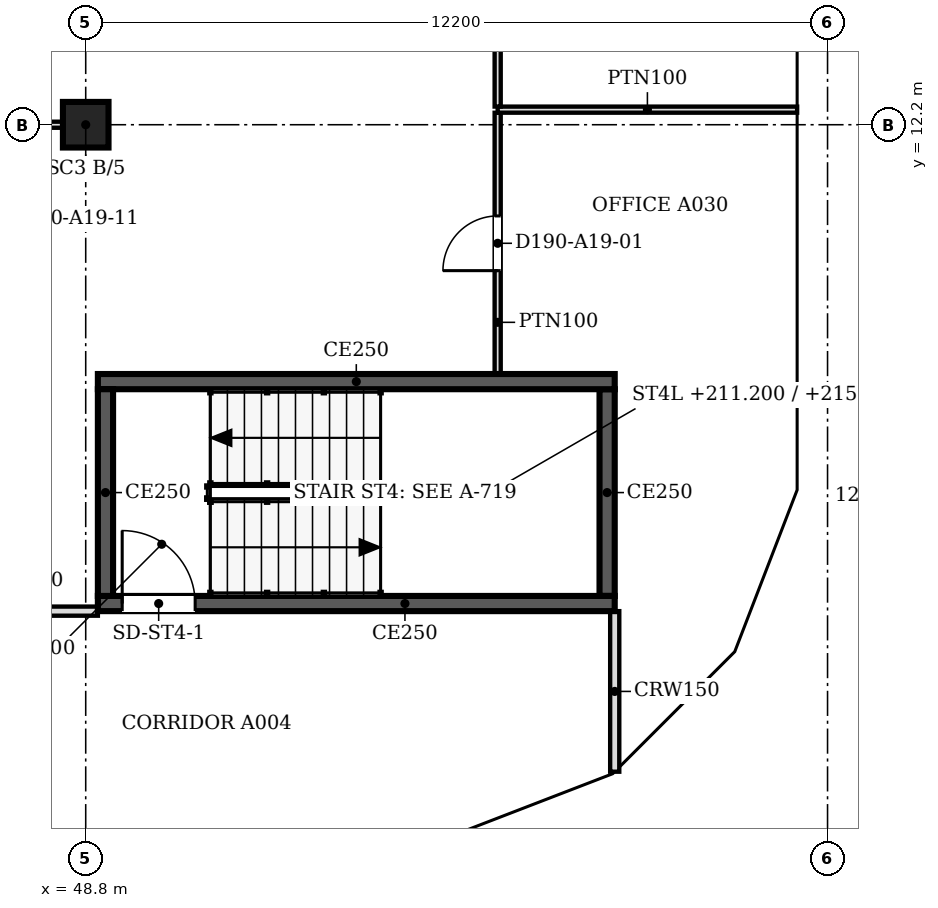
"""IFC4 building model, lengths in metres.
Left out: names, types, materials, properties, quantities, classifications, styles, units other than length and angle.
Written with IfcOpenShell. Run it as: python <this file> out.ifc"""

import sys

from ifc_helpers import new_model, si_unit, direction, frame, frame_2d, origin, origin_2d, place, context, subcontext, project, spatial, polyline, rectangle, outline, extrude, faceted_brep, source, transform, mapped, element, fill, save


model = new_model("IFC4")
c1 = context("Model", 3, precision=1e-05, world=origin(), true_north=direction((0.0, 1.0)))
c2 = subcontext(c1, "Body", "Model", "MODEL_VIEW")
j1 = project(units=[si_unit("LENGTHUNIT", "METRE"), si_unit("PLANEANGLEUNIT", "RADIAN")], contexts=[c1])
p1 = place(None, origin())
s1 = spatial("IfcSite", under=j1, at=p1, CompositionType="ELEMENT")
p2 = place(p1, origin())
s2 = spatial("IfcBuilding", under=s1, at=p2, CompositionType="ELEMENT")
p3 = place(p2, frame((0.0, 0.0, 209.3)))
s3 = spatial("IfcBuildingStorey", under=s2, at=p3, CompositionType="ELEMENT", Elevation=209.3)
p4 = place(p3, frame((48.8, 12.2, 0.0), z_axis=(0.0, 0.0, 1.0), x_axis=(1.0, 0.0, 0.0)))
e1 = element("IfcColumn", 1, at=p4, inside=s3, PredefinedType="COLUMN", context=c2, shape_type="SweptSolid", body=[
    extrude(rectangle(XDim=0.75, YDim=0.75, at=origin_2d()), origin(), (0.0, 0.0, 1.0), 3.6),
])
m1 = source(origin(), c2, "Body", "Brep", [
    faceted_brep([(2.95, -0.25, 0.0), (3.003, -0.25, 0.068), (3.003, -0.25, 7.532), (2.95, -0.25, 7.6), (0.0, -0.25, 3.8), (0.047, 0.25, 3.86), (2.898, 0.25, 7.532), (2.898, 0.25, 0.068), (0.047, 0.25, 3.74), (2.95, 0.0, 0.0), (2.95, 0.0, 7.6), (0.0, 0.0, 3.8)], [[[0, 1, 2, 3, 4]], [[5, 6, 7, 8]], [[1, 0, 9]], [[10, 3, 2]], [[6, 5, 11, 4, 3, 10]], [[8, 7, 9, 0, 4, 11]], [[8, 11, 5]], [[1, 9, 7, 6, 10, 2]]]),
])
p5 = place(p3, frame((54.854, 0.25, -3.8), z_axis=(0.0, 0.0, 1.0), x_axis=(0.932970071518, 0.359953949349, 0.0)))
e2 = element("IfcWall", 2, at=p5, inside=s3, PredefinedType="SOLIDWALL", context=c2, shape_type="MappedRepresentation", body=[
    mapped(m1, transform((0.0, 0.0, 0.0), scale=1.0)),
])
m2 = source(origin(), c2, "Body", "SweptSolid", [
    extrude(outline(polyline([(2.75, 6.935), (0.316, 3.8), (2.75, 0.665), (2.75, 6.935)])), frame((0.0, 0.26, 0.0), z_axis=(0.0, -1.0, 0.0), x_axis=(1.0, 0.0, 0.0)), (0.0, 0.0, 1.0), 0.52),
])
p6 = place(p5, origin())
e3 = element("IfcOpeningElement", 3, at=p6, cuts=e2, PredefinedType="OPENING", context=c2, shape_type="MappedRepresentation", body=[
    mapped(m2, transform((0.0, 0.0, 0.0), scale=1.0)),
])
m3 = source(origin(), c2, "Body", "Brep", [
    faceted_brep([(0.053, -0.25, 0.0), (2.997, -0.25, 3.8), (0.053, -0.25, 7.6), (0.0, -0.25, 7.532), (0.0, -0.25, 0.068), (0.106, 0.25, 7.532), (2.944, 0.25, 3.868), (2.944, 0.25, 3.732), (0.106, 0.25, 0.068), (2.997, 0.0, 3.8), (0.053, 0.0, 0.0), (0.053, 0.0, 7.6)], [[[0, 1, 2, 3, 4]], [[5, 6, 7, 8]], [[8, 7, 9, 1, 0, 10]], [[6, 5, 11, 2, 1, 9]], [[3, 2, 11]], [[10, 0, 4]], [[8, 10, 4, 3, 11, 5]], [[9, 7, 6]]]),
])
p7 = place(p3, frame((57.569, 1.274, -3.8), z_axis=(0.0, 0.0, 1.0), x_axis=(0.707066050402, 0.707147509625, 0.0)))
e4 = element("IfcWall", 4, at=p7, inside=s3, PredefinedType="SOLIDWALL", context=c2, shape_type="MappedRepresentation", body=[
    mapped(m3, transform((0.0, 0.0, 0.0), scale=1.0)),
])
m4 = source(origin(), c2, "Body", "SweptSolid", [
    extrude(outline(polyline([(0.253, 0.666), (2.681, 3.8), (0.253, 6.934), (0.253, 0.666)])), frame((0.0, 0.26, 0.0), z_axis=(0.0, -1.0, 0.0), x_axis=(1.0, 0.0, 0.0)), (0.0, 0.0, 1.0), 0.52),
])
p8 = place(p7, origin())
e5 = element("IfcOpeningElement", 5, at=p8, cuts=e4, PredefinedType="OPENING", context=c2, shape_type="MappedRepresentation", body=[
    mapped(m4, transform((0.0, 0.0, 0.0), scale=1.0)),
])
m5 = source(origin(), c2, "Body", "Brep", [
    faceted_brep([(2.95, -0.25, 0.0), (2.997, -0.25, 0.059), (2.997, -0.25, 7.541), (2.95, -0.25, 7.6), (0.0, -0.25, 3.8), (0.053, 0.25, 3.868), (2.904, 0.25, 7.54), (2.904, 0.25, 0.06), (0.053, 0.25, 3.732), (2.95, 0.0, 0.0), (2.95, 0.0, 7.6), (0.0, 0.0, 3.8)], [[[0, 1, 2, 3, 4]], [[5, 6, 7, 8]], [[1, 0, 9]], [[10, 3, 2]], [[6, 5, 11, 4, 3, 10]], [[8, 7, 9, 0, 4, 11]], [[8, 11, 5]], [[1, 9, 7, 6, 10, 2]]]),
])
p9 = place(p3, frame((59.688, 3.394, -3.8), z_axis=(0.0, 0.0, 1.0), x_axis=(0.359972353723, 0.932962970624, 0.0)))
e6 = element("IfcWall", 6, at=p9, inside=s3, PredefinedType="SOLIDWALL", context=c2, shape_type="MappedRepresentation", body=[
    mapped(m5, transform((0.0, 0.0, 0.0), scale=1.0)),
])
p10 = place(p9, origin())
e7 = element("IfcOpeningElement", 7, at=p10, cuts=e6, PredefinedType="OPENING", context=c2, shape_type="MappedRepresentation", body=[
    mapped(m2, transform((0.0, 0.0, 0.0), scale=1.0)),
])
m6 = source(origin(), c2, "Body", "Brep", [
    faceted_brep([(0.047, -0.25, 0.0), (3.05, -0.25, 3.8), (0.047, -0.25, 7.6), (0.0, -0.25, 7.54), (0.0, -0.25, 0.06), (0.093, 0.25, 7.541), (3.05, 0.25, 3.8), (0.093, 0.25, 0.059), (0.047, 0.0, 0.0), (0.047, 0.0, 7.6)], [[[0, 1, 2, 3, 4]], [[5, 6, 7]], [[7, 6, 1, 0, 8]], [[6, 5, 9, 2, 1]], [[3, 2, 9]], [[8, 0, 4]], [[7, 8, 4, 3, 9, 5]]]),
])
p11 = place(p3, frame((60.75, 6.1, -3.8), z_axis=(0.0, 0.0, 1.0), x_axis=(0.0, 1.0, 0.0)))
e8 = element("IfcWall", 8, at=p11, inside=s3, PredefinedType="SOLIDWALL", context=c2, shape_type="MappedRepresentation", body=[
    mapped(m6, transform((0.0, 0.0, 0.0), scale=1.0)),
])
m7 = source(origin(), c2, "Body", "SweptSolid", [
    extrude(outline(polyline([(0.247, 0.656), (2.731, 3.8), (0.247, 6.944), (0.247, 0.656)])), frame((0.0, 0.26, 0.0), z_axis=(0.0, -1.0, 0.0), x_axis=(1.0, 0.0, 0.0)), (0.0, 0.0, 1.0), 0.52),
])
p12 = place(p11, origin())
e9 = element("IfcOpeningElement", 9, at=p12, cuts=e8, PredefinedType="OPENING", context=c2, shape_type="MappedRepresentation", body=[
    mapped(m7, transform((0.0, 0.0, 0.0), scale=1.0)),
])
m8 = source(origin(), c2, "Body", "SweptSolid", [
    extrude(outline(polyline([(3.05, 0.0), (6.1, 3.8), (3.05, 7.6), (0.0, 3.8), (3.05, 0.0)])), frame((0.0, 0.25, 0.0), z_axis=(0.0, -1.0, 0.0), x_axis=(1.0, 0.0, 0.0)), (0.0, 0.0, 1.0), 0.5),
])
p13 = place(p3, frame((60.75, 9.15, -3.8), z_axis=(0.0, 0.0, 1.0), x_axis=(0.0, 1.0, 0.0)))
e10 = element("IfcWall", 10, at=p13, inside=s3, PredefinedType="SOLIDWALL", context=c2, shape_type="MappedRepresentation", body=[
    mapped(m8, transform((0.0, 0.0, 0.0), scale=1.0)),
])
m9 = source(origin(), c2, "Body", "SweptSolid", [
    extrude(outline(polyline([(3.05, 0.399), (5.78, 3.8), (3.05, 7.201), (0.321, 3.8), (3.05, 0.399)])), frame((0.0, 0.26, 0.0), z_axis=(0.0, -1.0, 0.0), x_axis=(1.0, 0.0, 0.0)), (0.0, 0.0, 1.0), 0.52),
])
p14 = place(p13, origin())
e11 = element("IfcOpeningElement", 11, at=p14, cuts=e10, PredefinedType="OPENING", context=c2, shape_type="MappedRepresentation", body=[
    mapped(m9, transform((0.0, 0.0, 0.0), scale=1.0)),
])
p15 = place(p2, frame((0.0, 0.0, 213.1)))
s4 = spatial("IfcBuildingStorey", under=s2, at=p15, CompositionType="ELEMENT", Elevation=213.1)
m10 = source(origin(), c2, "Body", "Brep", [
    faceted_brep([(0.047, -0.25, 0.0), (2.997, -0.25, 3.8), (0.047, -0.25, 7.6), (0.0, -0.25, 7.541), (0.0, -0.25, 0.059), (0.093, 0.25, 7.54), (2.944, 0.25, 3.868), (2.944, 0.25, 3.732), (0.093, 0.25, 0.06), (2.997, 0.0, 3.8), (0.047, 0.0, 0.0), (0.047, 0.0, 7.6)], [[[0, 1, 2, 3, 4]], [[5, 6, 7, 8]], [[8, 7, 9, 1, 0, 10]], [[6, 5, 11, 2, 1, 9]], [[3, 2, 11]], [[10, 0, 4]], [[8, 10, 4, 3, 11, 5]], [[7, 6, 9]]]),
])
p16 = place(p15, frame((54.81, 0.233, -3.8), z_axis=(0.0, 0.0, 1.0), x_axis=(0.932990326376, 0.359901446078, 0.0)))
e12 = element("IfcWall", 12, at=p16, inside=s4, PredefinedType="SOLIDWALL", context=c2, shape_type="MappedRepresentation", body=[
    mapped(m10, transform((0.0, 0.0, 0.0), scale=1.0)),
])
m11 = source(origin(), c2, "Body", "SweptSolid", [
    extrude(outline(polyline([(0.247, 0.665), (2.681, 3.8), (0.247, 6.935), (0.247, 0.665)])), frame((0.0, 0.26, 0.0), z_axis=(0.0, -1.0, 0.0), x_axis=(1.0, 0.0, 0.0)), (0.0, 0.0, 1.0), 0.52),
])
p17 = place(p16, origin())
e13 = element("IfcOpeningElement", 13, at=p17, cuts=e12, PredefinedType="OPENING", context=c2, shape_type="MappedRepresentation", body=[
    mapped(m11, transform((0.0, 0.0, 0.0), scale=1.0)),
])
m12 = source(origin(), c2, "Body", "Brep", [
    faceted_brep([(2.944, -0.25, 0.0), (2.997, -0.25, 0.068), (2.997, -0.25, 7.532), (2.944, -0.25, 7.6), (0.0, -0.25, 3.8), (0.053, 0.25, 3.868), (2.891, 0.25, 7.532), (2.891, 0.25, 0.068), (0.053, 0.25, 3.732), (2.944, 0.0, 0.0), (2.944, 0.0, 7.6), (0.0, 0.0, 3.8)], [[[0, 1, 2, 3, 4]], [[5, 6, 7, 8]], [[1, 0, 9]], [[10, 3, 2]], [[6, 5, 11, 4, 3, 10]], [[8, 7, 9, 0, 4, 11]], [[8, 11, 5]], [[1, 9, 7, 6, 10, 2]]]),
])
p18 = place(p15, frame((57.606, 1.312, -3.8), z_axis=(0.0, 0.0, 1.0), x_axis=(0.707147509625, 0.707066050402, 0.0)))
e14 = element("IfcWall", 14, at=p18, inside=s4, PredefinedType="SOLIDWALL", context=c2, shape_type="MappedRepresentation", body=[
    mapped(m12, transform((0.0, 0.0, 0.0), scale=1.0)),
])
m13 = source(origin(), c2, "Body", "SweptSolid", [
    extrude(outline(polyline([(2.744, 6.934), (0.316, 3.8), (2.744, 0.666), (2.744, 6.934)])), frame((0.0, 0.26, 0.0), z_axis=(0.0, -1.0, 0.0), x_axis=(1.0, 0.0, 0.0)), (0.0, 0.0, 1.0), 0.52),
])
p19 = place(p18, origin())
e15 = element("IfcOpeningElement", 15, at=p19, cuts=e14, PredefinedType="OPENING", context=c2, shape_type="MappedRepresentation", body=[
    mapped(m13, transform((0.0, 0.0, 0.0), scale=1.0)),
])
m14 = source(origin(), c2, "Body", "Brep", [
    faceted_brep([(0.053, -0.25, 0.0), (3.003, -0.25, 3.8), (0.053, -0.25, 7.6), (0.0, -0.25, 7.531), (0.0, -0.25, 0.068), (0.106, 0.25, 7.532), (2.957, 0.25, 3.86), (2.957, 0.25, 3.74), (0.106, 0.25, 0.068), (3.003, 0.0, 3.8), (0.053, 0.0, 0.0), (0.053, 0.0, 7.6)], [[[0, 1, 2, 3, 4]], [[5, 6, 7, 8]], [[8, 7, 9, 1, 0, 10]], [[6, 5, 11, 2, 1, 9]], [[3, 2, 11]], [[10, 0, 4]], [[8, 10, 4, 3, 11, 5]], [[7, 6, 9]]]),
])
p20 = place(p15, frame((59.669, 3.344, -3.8), z_axis=(0.0, 0.0, 1.0), x_axis=(0.35992665181, 0.932980602862, 0.0)))
e16 = element("IfcWall", 16, at=p20, inside=s4, PredefinedType="SOLIDWALL", context=c2, shape_type="MappedRepresentation", body=[
    mapped(m14, transform((0.0, 0.0, 0.0), scale=1.0)),
])
m15 = source(origin(), c2, "Body", "SweptSolid", [
    extrude(outline(polyline([(0.253, 0.665), (2.687, 3.8), (0.253, 6.935), (0.253, 0.665)])), frame((0.0, 0.26, 0.0), z_axis=(0.0, -1.0, 0.0), x_axis=(1.0, 0.0, 0.0)), (0.0, 0.0, 1.0), 0.52),
])
p21 = place(p20, origin())
e17 = element("IfcOpeningElement", 17, at=p21, cuts=e16, PredefinedType="OPENING", context=c2, shape_type="MappedRepresentation", body=[
    mapped(m15, transform((0.0, 0.0, 0.0), scale=1.0)),
])
m16 = source(origin(), c2, "Body", "Brep", [
    faceted_brep([(3.003, -0.25, 0.0), (6.053, -0.25, 3.8), (3.003, -0.25, 7.6), (0.0, -0.25, 3.8), (0.047, 0.25, 3.859), (3.003, 0.25, 7.6), (6.053, 0.25, 3.8), (3.003, 0.25, 0.0), (0.047, 0.25, 3.741), (0.0, 0.0, 3.8)], [[[0, 1, 2, 3]], [[4, 5, 6, 7, 8]], [[7, 6, 1, 0]], [[6, 5, 2, 1]], [[5, 4, 9, 3, 2]], [[8, 7, 0, 3, 9]], [[8, 9, 4]]]),
])
p22 = place(p15, frame((60.75, 6.146, -3.8), z_axis=(0.0, 0.0, 1.0), x_axis=(0.0, 1.0, 0.0)))
e18 = element("IfcWall", 18, at=p22, inside=s4, PredefinedType="SOLIDWALL", context=c2, shape_type="MappedRepresentation", body=[
    mapped(m16, transform((0.0, 0.0, 0.0), scale=1.0)),
])
m17 = source(origin(), c2, "Body", "SweptSolid", [
    extrude(outline(polyline([(3.005, 0.401), (5.733, 3.8), (3.005, 7.199), (0.319, 3.8), (3.005, 0.401)])), frame((0.0, 0.26, 0.0), z_axis=(0.0, -1.0, 0.0), x_axis=(1.0, 0.0, 0.0)), (0.0, 0.0, 1.0), 0.52),
])
p23 = place(p22, origin())
e19 = element("IfcOpeningElement", 19, at=p23, cuts=e18, PredefinedType="OPENING", context=c2, shape_type="MappedRepresentation", body=[
    mapped(m17, transform((0.0, 0.0, 0.0), scale=1.0)),
])
m18 = source(origin(), c2, "Body", "SweptSolid", [
    extrude(outline(polyline([(3.05, 0.0), (6.1, 3.8), (3.05, 7.6), (0.0, 3.8), (3.05, 0.0)])), frame((0.0, 0.25, 0.0), z_axis=(0.0, -1.0, 0.0), x_axis=(1.0, 0.0, 0.0)), (0.0, 0.0, 1.0), 0.5),
])
p24 = place(p15, frame((60.75, 12.2, -3.8), z_axis=(0.0, 0.0, 1.0), x_axis=(0.0, 1.0, 0.0)))
e20 = element("IfcWall", 20, at=p24, inside=s4, PredefinedType="SOLIDWALL", context=c2, shape_type="MappedRepresentation", body=[
    mapped(m18, transform((0.0, 0.0, 0.0), scale=1.0)),
])
m19 = source(origin(), c2, "Body", "SweptSolid", [
    extrude(outline(polyline([(3.05, 0.399), (5.78, 3.8), (3.05, 7.2), (0.321, 3.8), (3.05, 0.399)])), frame((0.0, 0.26, 0.0), z_axis=(0.0, -1.0, 0.0), x_axis=(1.0, 0.0, 0.0)), (0.0, 0.0, 1.0), 0.52),
])
p25 = place(p24, origin())
e21 = element("IfcOpeningElement", 21, at=p25, cuts=e20, PredefinedType="OPENING", context=c2, shape_type="MappedRepresentation", body=[
    mapped(m19, transform((0.0, 0.0, 0.0), scale=1.0)),
])
p26 = place(p3, frame((57.5, 4.325, 0.0), z_axis=(0.0, 0.0, 1.0), x_axis=(-1.0, 0.0, 0.0)))
e22 = element("IfcWall", 22, at=p26, inside=s3, PredefinedType="SOLIDWALL", context=c2, shape_type="SweptSolid", body=[
    extrude(rectangle(XDim=8.5, YDim=0.25, at=frame_2d((4.25, 0.0))), origin(), (0.0, 0.0, 1.0), 3.8),
])
m20 = source(origin(), c2, "Body", "SweptSolid", [
    extrude(rectangle(XDim=1.2, YDim=2.1, at=frame_2d((0.6, 1.05))), frame((0.0, 0.135, 0.0), z_axis=(0.0, -1.0, 0.0), x_axis=(1.0, 0.0, 0.0)), (0.0, 0.0, 1.0), 0.27),
])
p27 = place(p26, frame((6.9, 0.0, 0.0)))
e23 = element("IfcOpeningElement", 23, at=p27, cuts=e22, PredefinedType="OPENING", context=c2, shape_type="MappedRepresentation", body=[
    mapped(m20, transform((0.0, 0.0, 0.0), scale=1.0)),
])
p28 = place(p3, frame((49.125, 4.45, 0.0), z_axis=(0.0, 0.0, 1.0), x_axis=(0.0, 1.0, 0.0)))
e24 = element("IfcWall", 24, at=p28, inside=s3, PredefinedType="SOLIDWALL", context=c2, shape_type="SweptSolid", body=[
    extrude(rectangle(XDim=3.4, YDim=0.25, at=frame_2d((1.7, 0.0))), origin(), (0.0, 0.0, 1.0), 3.8),
])
p29 = place(p3, frame((49.0, 7.975, 0.0), z_axis=(0.0, 0.0, 1.0), x_axis=(1.0, 0.0, 0.0)))
e25 = element("IfcWall", 25, at=p29, inside=s3, PredefinedType="SOLIDWALL", context=c2, shape_type="SweptSolid", body=[
    extrude(rectangle(XDim=8.5, YDim=0.25, at=frame_2d((4.25, 0.0))), origin(), (0.0, 0.0, 1.0), 3.8),
])
p30 = place(p3, frame((57.375, 7.85, 0.0), z_axis=(0.0, 0.0, 1.0), x_axis=(0.0, -1.0, 0.0)))
e26 = element("IfcWall", 26, at=p30, inside=s3, PredefinedType="SOLIDWALL", context=c2, shape_type="SweptSolid", body=[
    extrude(rectangle(XDim=3.4, YDim=0.25, at=frame_2d((1.7, 0.0))), origin(), (0.0, 0.0, 1.0), 3.8),
])
p31 = place(p3, frame((57.5, 1.559, 0.0), z_axis=(0.0, 0.0, 1.0), x_axis=(0.0, 1.0, 0.0)))
e27 = element("IfcWall", 27, at=p31, inside=s3, PredefinedType="PARTITIONING", context=c2, shape_type="SweptSolid", body=[
    extrude(rectangle(XDim=2.641, YDim=0.15, at=frame_2d((1.32, 0.0))), origin(), (0.0, 0.0, 1.0), 3.067),
])
p32 = place(p3, frame((46.476, 4.2, 0.0), z_axis=(0.0, 0.0, 1.0), x_axis=(1.0, 0.0, 0.0)))
e28 = element("IfcWall", 28, at=p32, inside=s3, PredefinedType="PARTITIONING", context=c2, shape_type="SweptSolid", body=[
    extrude(rectangle(XDim=2.524, YDim=0.15, at=frame_2d((1.262, 0.0))), origin(), (0.0, 0.0, 1.0), 3.067),
])
p33 = place(p3, frame((55.575, 12.397, 0.0), z_axis=(0.0, 0.0, 1.0), x_axis=(0.0, -1.0, 0.0)))
e29 = element("IfcWall", 29, at=p33, inside=s3, PredefinedType="PARTITIONING", context=c2, shape_type="SweptSolid", body=[
    extrude(rectangle(XDim=4.297, YDim=0.1, at=frame_2d((2.148, 0.0))), origin(), (0.0, 0.0, 1.0), 3.067),
])
m21 = source(origin(), c2, "Body", "SweptSolid", [
    extrude(rectangle(XDim=0.9, YDim=2.1, at=frame_2d((0.45, 1.05))), frame((0.0, 0.06, 0.0), z_axis=(0.0, -1.0, 0.0), x_axis=(1.0, 0.0, 0.0)), (0.0, 0.0, 1.0), 0.12),
])
p34 = place(p33, frame((1.697, 0.0, 0.0)))
e30 = element("IfcOpeningElement", 30, at=p34, cuts=e29, PredefinedType="OPENING", context=c2, shape_type="MappedRepresentation", body=[
    mapped(m21, transform((0.0, 0.0, 0.0), scale=1.0)),
])
p35 = place(p3, frame((48.425, 12.2, 0.0), z_axis=(0.0, 0.0, 1.0), x_axis=(-1.0, 0.0, 0.0)))
e31 = element("IfcWall", 31, at=p35, inside=s3, PredefinedType="PARTITIONING", context=c2, shape_type="SweptSolid", body=[
    extrude(rectangle(XDim=1.95, YDim=0.1, at=frame_2d((0.975, 0.0))), origin(), (0.0, 0.0, 1.0), 3.067),
])
p36 = place(p3, frame((55.575, 12.448, 0.0), z_axis=(0.0, 0.0, 1.0), x_axis=(1.0, 0.0, 0.0)))
e32 = element("IfcWall", 32, at=p36, inside=s3, PredefinedType="PARTITIONING", context=c2, shape_type="SweptSolid", body=[
    extrude(rectangle(XDim=4.925, YDim=0.1, at=frame_2d((2.462, 0.0))), origin(), (0.0, 0.0, 1.0), 3.067),
])
p37 = place(p3, frame((55.575, 17.024, 0.0), z_axis=(0.0, 0.0, 1.0), x_axis=(0.0, -1.0, 0.0)))
e33 = element("IfcWall", 33, at=p37, inside=s3, PredefinedType="PARTITIONING", context=c2, shape_type="SweptSolid", body=[
    extrude(rectangle(XDim=4.525, YDim=0.1, at=frame_2d((2.263, 0.0))), origin(), (0.0, 0.0, 1.0), 3.067),
])
p38 = place(p37, frame((1.825, 0.0, 0.0)))
e34 = element("IfcOpeningElement", 34, at=p38, cuts=e33, PredefinedType="OPENING", context=c2, shape_type="MappedRepresentation", body=[
    mapped(m21, transform((0.0, 0.0, 0.0), scale=1.0)),
])
m22 = source(origin(), c2, "Body", "SweptSolid", [
    extrude(rectangle(XDim=1.2, YDim=2.1, at=frame_2d((0.6, 1.05))), frame((0.0, 0.025, 0.0), z_axis=(0.0, -1.0, 0.0), x_axis=(1.0, 0.0, 0.0)), (0.0, 0.0, 1.0), 0.05),
])
p39 = place(p27, origin())
e35 = element("IfcDoor", 35, at=p39, inside=s3, OperationType="SINGLE_SWING_RIGHT", PredefinedType="DOOR", context=c2, shape_type="MappedRepresentation", body=[
    mapped(m22, transform((0.0, 0.0, 0.0), scale=1.0)),
])
fill(e23, e35)
m23 = source(origin(), c2, "Body", "SweptSolid", [
    extrude(rectangle(XDim=0.9, YDim=2.1, at=frame_2d((0.45, 1.05))), frame((0.0, 0.025, 0.0), z_axis=(0.0, -1.0, 0.0), x_axis=(1.0, 0.0, 0.0)), (0.0, 0.0, 1.0), 0.05),
])
p40 = place(p34, origin())
e36 = element("IfcDoor", 36, at=p40, inside=s3, OperationType="SINGLE_SWING_RIGHT", PredefinedType="DOOR", context=c2, shape_type="MappedRepresentation", body=[
    mapped(m23, transform((0.0, 0.0, 0.0), scale=1.0)),
])
fill(e30, e36)
save(model, sys.argv[1])
